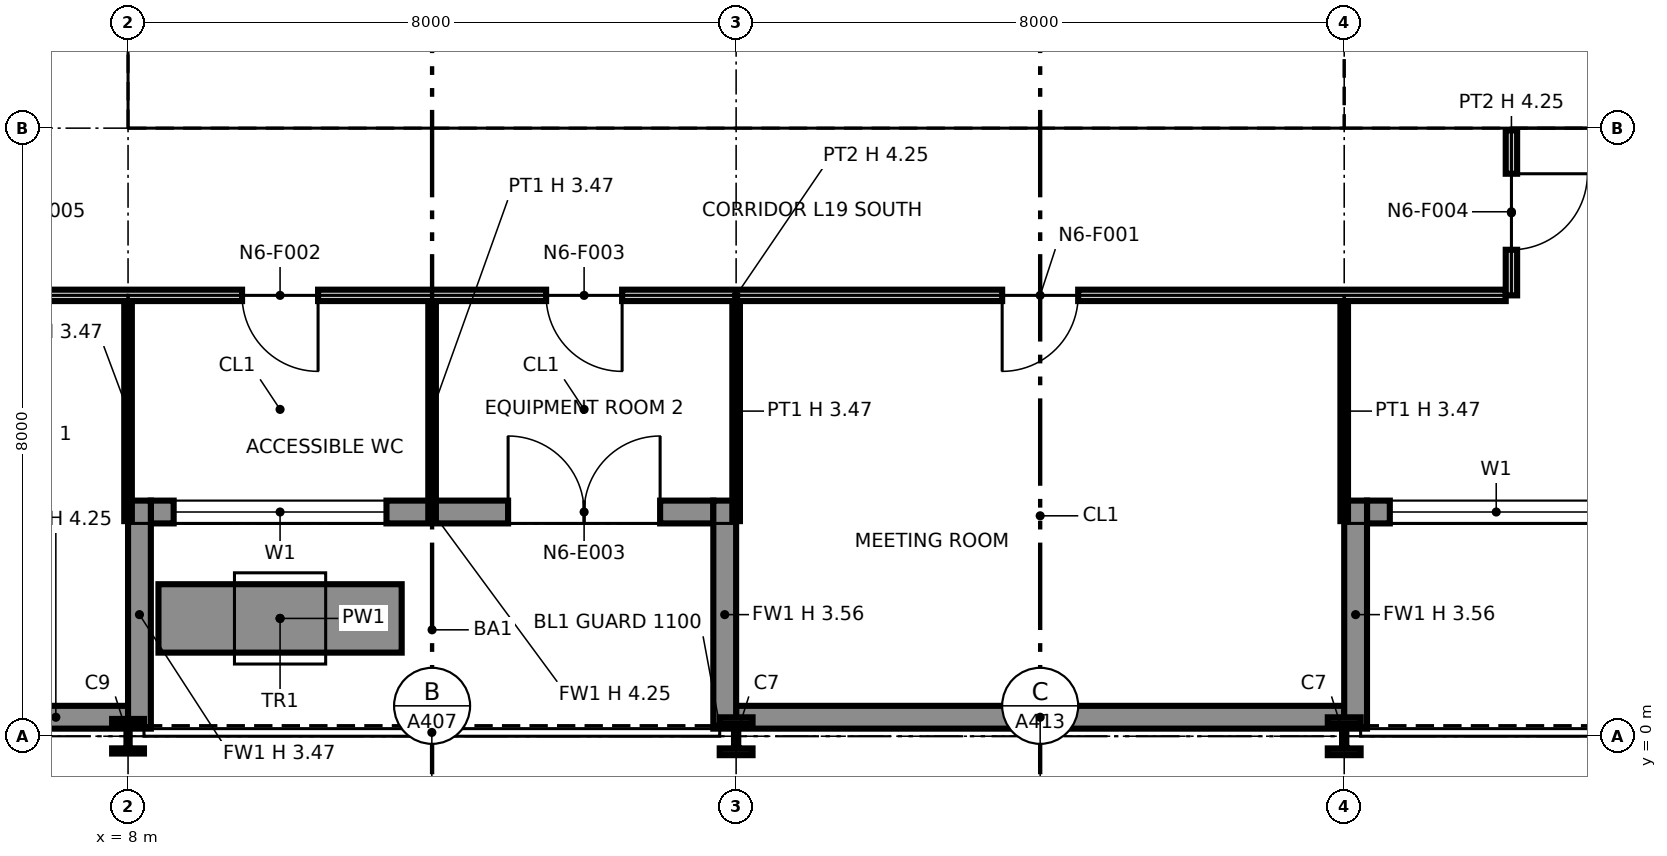
"""IFC4 building model, lengths in metres.
Left out: names, types, materials, properties, quantities, classifications, styles, units other than length and angle.
Written with IfcOpenShell. Run it as: python <this file> out.ifc"""

import sys

from ifc_helpers import new_model, si_unit, direction, frame, frame_2d, origin, origin_2d, place, context, subcontext, project, spatial, polyline, rectangle, i_section, outline, extrude, element, fill, save


model = new_model("IFC4")
c1 = context("Model", 3, precision=1e-05, world=origin(), true_north=direction((0.0, 1.0)))
c2 = subcontext(c1, "Body", "Model", "MODEL_VIEW")
j1 = project(units=[si_unit("LENGTHUNIT", "METRE"), si_unit("PLANEANGLEUNIT", "RADIAN")], contexts=[c1])
p1 = place(None, origin())
s1 = spatial("IfcSite", under=j1, at=p1, CompositionType="ELEMENT")
p2 = place(p1, origin())
s2 = spatial("IfcBuilding", under=s1, at=p2, CompositionType="ELEMENT")
p3 = place(p2, frame((0.0, 0.0, 100.8)))
s3 = spatial("IfcBuildingStorey", under=s2, at=p3, CompositionType="ELEMENT", Elevation=100.8)
p4 = place(p3, frame((8.0, 0.0, 0.0), z_axis=(0.0, 0.0, 1.0), x_axis=(1.0, 0.0, 0.0)))
e1 = element("IfcColumn", 1, at=p4, inside=s3, PredefinedType="COLUMN", context=c2, shape_type="SweptSolid", body=[
    extrude(i_section(OverallWidth=0.419, OverallDepth=0.455, WebThickness=0.042, FlangeThickness=0.068, at=origin_2d()), origin(), (0.0, 0.0, 1.0), 4.25),
])
p5 = place(p3, frame((8.0, 8.0, 0.0), z_axis=(0.0, 0.0, 1.0), x_axis=(1.0, 0.0, 0.0)))
e2 = element("IfcColumn", 2, at=p5, inside=s3, PredefinedType="COLUMN", context=c2, shape_type="SweptSolid", body=[
    extrude(i_section(OverallWidth=0.406, OverallDepth=0.417, WebThickness=0.03, FlangeThickness=0.048, at=origin_2d()), origin(), (0.0, 0.0, 1.0), 4.25),
])
p6 = place(p3, frame((16.0, 0.0, 0.0), z_axis=(0.0, 0.0, 1.0), x_axis=(1.0, 0.0, 0.0)))
e3 = element("IfcColumn", 3, at=p6, inside=s3, PredefinedType="COLUMN", context=c2, shape_type="SweptSolid", body=[
    extrude(i_section(OverallWidth=0.432, OverallDepth=0.498, WebThickness=0.056, FlangeThickness=0.089, at=origin_2d()), origin(), (0.0, 0.0, 1.0), 4.25),
])
p7 = place(p3, frame((16.0, 8.0, 0.0), z_axis=(0.0, 0.0, 1.0), x_axis=(1.0, 0.0, 0.0)))
e4 = element("IfcColumn", 4, at=p7, inside=s3, PredefinedType="COLUMN", context=c2, shape_type="SweptSolid", body=[
    extrude(i_section(OverallWidth=0.406, OverallDepth=0.417, WebThickness=0.03, FlangeThickness=0.048, at=origin_2d()), origin(), (0.0, 0.0, 1.0), 4.25),
])
p8 = place(p3, frame((24.0, 0.0, 0.0), z_axis=(0.0, 0.0, 1.0), x_axis=(1.0, 0.0, 0.0)))
e5 = element("IfcColumn", 5, at=p8, inside=s3, PredefinedType="COLUMN", context=c2, shape_type="SweptSolid", body=[
    extrude(i_section(OverallWidth=0.432, OverallDepth=0.498, WebThickness=0.056, FlangeThickness=0.089, at=origin_2d()), origin(), (0.0, 0.0, 1.0), 4.25),
])
p9 = place(p3, frame((24.0, 8.0, 0.0), z_axis=(0.0, 0.0, 1.0), x_axis=(1.0, 0.0, 0.0)))
e6 = element("IfcColumn", 6, at=p9, inside=s3, PredefinedType="COLUMN", context=c2, shape_type="SweptSolid", body=[
    extrude(i_section(OverallWidth=0.411, OverallDepth=0.434, WebThickness=0.036, FlangeThickness=0.057, at=origin_2d()), origin(), (0.0, 0.0, 1.0), 4.25),
])
p10 = place(p3, frame((6.1, 0.25, 0.0), z_axis=(0.0, 0.0, 1.0), x_axis=(1.0, 0.0, 0.0)))
e7 = element("IfcWall", 7, at=p10, inside=s3, PredefinedType="SOLIDWALL", context=c2, shape_type="SweptSolid", body=[
    extrude(rectangle(XDim=1.9, YDim=0.3, at=frame_2d((0.95, 0.0))), origin(), (0.0, 0.0, 1.0), 4.25),
])
p11 = place(p3, frame((8.3, 2.95, 0.0), z_axis=(0.0, 0.0, 1.0), x_axis=(1.0, 0.0, 0.0)))
e8 = element("IfcWall", 8, at=p11, inside=s3, PredefinedType="SOLIDWALL", context=c2, shape_type="SweptSolid", body=[
    extrude(rectangle(XDim=7.4, YDim=0.3, at=frame_2d((3.7, 0.0))), origin(), (0.0, 0.0, 1.0), 4.25),
])
p12 = place(p11, frame((0.3, 0.0, 0.9)))
e9 = element("IfcOpeningElement", 9, at=p12, cuts=e8, PredefinedType="OPENING", context=c2, shape_type="SweptSolid", body=[
    extrude(rectangle(XDim=2.8, YDim=2.2, at=frame_2d((1.4, 1.1))), frame((0.0, 0.16, 0.0), z_axis=(0.0, -1.0, 0.0), x_axis=(1.0, 0.0, 0.0)), (0.0, 0.0, 1.0), 0.32),
])
p13 = place(p11, frame((4.7, 0.0, 0.0)))
e10 = element("IfcOpeningElement", 10, at=p13, cuts=e8, PredefinedType="OPENING", context=c2, shape_type="SweptSolid", body=[
    extrude(rectangle(XDim=2.0, YDim=2.4, at=frame_2d((1.0, 1.2))), frame((0.0, 0.16, 0.0), z_axis=(0.0, -1.0, 0.0), x_axis=(1.0, 0.0, 0.0)), (0.0, 0.0, 1.0), 0.32),
])
p14 = place(p3, frame((8.15, 0.1, 0.0), z_axis=(0.0, 0.0, 1.0), x_axis=(0.0, 1.0, 0.0)))
e11 = element("IfcWall", 11, at=p14, inside=s3, PredefinedType="SOLIDWALL", context=c2, shape_type="SweptSolid", body=[
    extrude(rectangle(XDim=3.0, YDim=0.3, at=frame_2d((1.5, 0.0))), origin(), (0.0, 0.0, 1.0), 3.469),
])
p15 = place(p3, frame((15.85, 0.1, 0.0), z_axis=(0.0, 0.0, 1.0), x_axis=(0.0, 1.0, 0.0)))
e12 = element("IfcWall", 12, at=p15, inside=s3, PredefinedType="SOLIDWALL", context=c2, shape_type="SweptSolid", body=[
    extrude(rectangle(XDim=3.0, YDim=0.3, at=frame_2d((1.5, 0.0))), origin(), (0.0, 0.0, 1.0), 3.556),
])
p16 = place(p3, frame((16.0, 0.25, 0.0), z_axis=(0.0, 0.0, 1.0), x_axis=(1.0, 0.0, 0.0)))
e13 = element("IfcWall", 13, at=p16, inside=s3, PredefinedType="SOLIDWALL", context=c2, shape_type="SweptSolid", body=[
    extrude(rectangle(XDim=8.0, YDim=0.3, at=frame_2d((4.0, 0.0))), origin(), (0.0, 0.0, 1.0), 4.25),
])
p17 = place(p3, frame((24.3, 2.95, 0.0), z_axis=(0.0, 0.0, 1.0), x_axis=(1.0, 0.0, 0.0)))
e14 = element("IfcWall", 14, at=p17, inside=s3, PredefinedType="SOLIDWALL", context=c2, shape_type="SweptSolid", body=[
    extrude(rectangle(XDim=7.4, YDim=0.3, at=frame_2d((3.7, 0.0))), origin(), (0.0, 0.0, 1.0), 4.25),
])
p18 = place(p17, frame((0.3, 0.0, 0.9)))
e15 = element("IfcOpeningElement", 15, at=p18, cuts=e14, PredefinedType="OPENING", context=c2, shape_type="SweptSolid", body=[
    extrude(rectangle(XDim=2.8, YDim=2.2, at=frame_2d((1.4, 1.1))), frame((0.0, 0.16, 0.0), z_axis=(0.0, -1.0, 0.0), x_axis=(1.0, 0.0, 0.0)), (0.0, 0.0, 1.0), 0.32),
])
p19 = place(p17, frame((4.7, 0.0, 0.0)))
e16 = element("IfcOpeningElement", 16, at=p19, cuts=e14, PredefinedType="OPENING", context=c2, shape_type="SweptSolid", body=[
    extrude(rectangle(XDim=2.0, YDim=2.4, at=frame_2d((1.0, 1.2))), frame((0.0, 0.16, 0.0), z_axis=(0.0, -1.0, 0.0), x_axis=(1.0, 0.0, 0.0)), (0.0, 0.0, 1.0), 0.32),
])
p20 = place(p3, frame((24.15, 0.1, 0.0), z_axis=(0.0, 0.0, 1.0), x_axis=(0.0, 1.0, 0.0)))
e17 = element("IfcWall", 17, at=p20, inside=s3, PredefinedType="SOLIDWALL", context=c2, shape_type="SweptSolid", body=[
    extrude(rectangle(XDim=3.0, YDim=0.3, at=frame_2d((1.5, 0.0))), origin(), (0.0, 0.0, 1.0), 3.556),
])
p21 = place(p3, frame((8.4, 1.55, 0.0), z_axis=(0.0, 0.0, 1.0), x_axis=(1.0, 0.0, 0.0)))
e18 = element("IfcWall", 18, at=p21, inside=s3, PredefinedType="SOLIDWALL", context=c2, shape_type="SweptSolid", body=[
    extrude(rectangle(XDim=3.2, YDim=0.9, at=frame_2d((1.6, 0.0))), origin(), (0.0, 0.0, 1.0), 0.6),
])
p22 = place(p3, frame((8.65, 8.75, 0.0), z_axis=(0.0, 0.0, 1.0), x_axis=(1.0, 0.0, 0.0)))
e19 = element("IfcWall", 19, at=p22, inside=s3, PredefinedType="PARTITIONING", context=c2, shape_type="SweptSolid", body=[
    extrude(outline(polyline([(0.0, 0.0), (14.7, 0.0), (14.7, 4.25), (7.469, 4.25), (7.469, 3.632), (7.231, 3.632), (7.23, 4.25), (0.0, 4.25), (0.0, 0.0)])), frame((0.0, 0.1, 0.0), z_axis=(0.0, -1.0, 0.0), x_axis=(1.0, 0.0, 0.0)), (0.0, 0.0, 1.0), 0.2),
])
p23 = place(p22, frame((1.3, 0.0, 0.0)))
e20 = element("IfcOpeningElement", 20, at=p23, cuts=e19, PredefinedType="OPENING", context=c2, shape_type="SweptSolid", body=[
    extrude(rectangle(XDim=1.4, YDim=2.1, at=frame_2d((0.7, 1.05))), frame((0.0, 0.11, 0.0), z_axis=(0.0, -1.0, 0.0), x_axis=(1.0, 0.0, 0.0)), (0.0, 0.0, 1.0), 0.22),
])
p24 = place(p22, frame((4.6, 0.0, 0.0)))
e21 = element("IfcOpeningElement", 21, at=p24, cuts=e19, PredefinedType="OPENING", context=c2, shape_type="SweptSolid", body=[
    extrude(rectangle(XDim=1.4, YDim=2.1, at=frame_2d((0.7, 1.05))), frame((0.0, 0.11, 0.0), z_axis=(0.0, -1.0, 0.0), x_axis=(1.0, 0.0, 0.0)), (0.0, 0.0, 1.0), 0.22),
])
p25 = place(p22, frame((10.4, 0.0, 0.0)))
e22 = element("IfcOpeningElement", 22, at=p25, cuts=e19, PredefinedType="OPENING", context=c2, shape_type="SweptSolid", body=[
    extrude(rectangle(XDim=1.2, YDim=2.1, at=frame_2d((0.6, 1.05))), frame((0.0, 0.11, 0.0), z_axis=(0.0, -1.0, 0.0), x_axis=(1.0, 0.0, 0.0)), (0.0, 0.0, 1.0), 0.22),
])
p26 = place(p3, frame((8.75, 8.85, 0.0), z_axis=(0.0, 0.0, 1.0), x_axis=(0.0, 1.0, 0.0)))
e23 = element("IfcWall", 23, at=p26, inside=s3, PredefinedType="PARTITIONING", context=c2, shape_type="SweptSolid", body=[
    extrude(outline(polyline([(0.0, 0.0), (14.3, 0.0), (14.3, 4.25), (10.231, 4.25), (10.23, 3.789), (10.07, 3.789), (10.069, 4.25), (7.27, 4.25), (7.269, 3.632), (7.031, 3.632), (7.031, 4.25), (0.0, 4.25), (0.0, 0.0)])), frame((0.0, 0.1, 0.0), z_axis=(0.0, -1.0, 0.0), x_axis=(1.0, 0.0, 0.0)), (0.0, 0.0, 1.0), 0.2),
])
p27 = place(p26, frame((8.3, 0.0, 0.0)))
e24 = element("IfcOpeningElement", 24, at=p27, cuts=e23, PredefinedType="OPENING", context=c2, shape_type="SweptSolid", body=[
    extrude(rectangle(XDim=1.8, YDim=2.1, at=frame_2d((0.9, 1.05))), frame((0.0, 0.11, 0.0), z_axis=(0.0, -1.0, 0.0), x_axis=(1.0, 0.0, 0.0)), (0.0, 0.0, 1.0), 0.22),
])
p28 = place(p3, frame((12.4, 8.85, 0.0), z_axis=(0.0, 0.0, 1.0), x_axis=(0.0, 1.0, 0.0)))
e25 = element("IfcWall", 25, at=p28, inside=s3, PredefinedType="PARTITIONING", context=c2, shape_type="SweptSolid", body=[
    extrude(rectangle(XDim=6.85, YDim=0.2, at=frame_2d((3.425, 0.0))), origin(), (0.0, 0.0, 1.0), 4.25),
])
p29 = place(p3, frame((15.85, 8.85, 0.0), z_axis=(0.0, 0.0, 1.0), x_axis=(0.0, 1.0, 0.0)))
e26 = element("IfcWall", 26, at=p29, inside=s3, PredefinedType="PARTITIONING", context=c2, shape_type="SweptSolid", body=[
    extrude(rectangle(XDim=1.55, YDim=0.9, at=frame_2d((0.775, 0.0))), origin(), (0.0, 0.0, 1.0), 3.632),
])
p30 = place(p29, frame((0.3, 0.0, 0.0)))
e27 = element("IfcOpeningElement", 27, at=p30, cuts=e26, PredefinedType="OPENING", context=c2, shape_type="SweptSolid", body=[
    extrude(rectangle(XDim=1.1, YDim=2.1, at=frame_2d((0.55, 1.05))), frame((0.0, 0.46, 0.0), z_axis=(0.0, -1.0, 0.0), x_axis=(1.0, 0.0, 0.0)), (0.0, 0.0, 1.0), 0.92),
])
p31 = place(p3, frame((23.25, 8.85, 0.0), z_axis=(0.0, 0.0, 1.0), x_axis=(0.0, 1.0, 0.0)))
e28 = element("IfcWall", 28, at=p31, inside=s3, PredefinedType="PARTITIONING", context=c2, shape_type="SweptSolid", body=[
    extrude(outline(polyline([(0.0, 0.0), (14.3, 0.0), (14.3, 4.25), (11.231, 4.25), (11.23, 3.789), (11.07, 3.789), (11.069, 4.25), (7.27, 4.25), (7.269, 3.632), (7.031, 3.632), (7.031, 4.25), (1.231, 4.25), (1.23, 3.789), (1.07, 3.789), (1.069, 4.25), (0.0, 4.25), (0.0, 0.0)])), frame((0.0, 0.1, 0.0), z_axis=(0.0, -1.0, 0.0), x_axis=(1.0, 0.0, 0.0)), (0.0, 0.0, 1.0), 0.2),
])
p32 = place(p31, frame((8.3, 0.0, 0.0)))
e29 = element("IfcOpeningElement", 29, at=p32, cuts=e28, PredefinedType="OPENING", context=c2, shape_type="SweptSolid", body=[
    extrude(rectangle(XDim=1.8, YDim=2.1, at=frame_2d((0.9, 1.05))), frame((0.0, 0.11, 0.0), z_axis=(0.0, -1.0, 0.0), x_axis=(1.0, 0.0, 0.0)), (0.0, 0.0, 1.0), 0.22),
])
p33 = place(p3, frame((24.65, 8.75, 0.0), z_axis=(0.0, 0.0, 1.0), x_axis=(1.0, 0.0, 0.0)))
e30 = element("IfcWall", 30, at=p33, inside=s3, PredefinedType="PARTITIONING", context=c2, shape_type="SweptSolid", body=[
    extrude(outline(polyline([(0.0, 0.0), (14.7, 0.0), (14.7, 4.25), (7.469, 4.25), (7.469, 3.632), (7.231, 3.632), (7.23, 4.25), (0.0, 4.25), (0.0, 0.0)])), frame((0.0, 0.1, 0.0), z_axis=(0.0, -1.0, 0.0), x_axis=(1.0, 0.0, 0.0)), (0.0, 0.0, 1.0), 0.2),
])
p34 = place(p3, frame((24.75, 8.85, 0.0), z_axis=(0.0, 0.0, 1.0), x_axis=(0.0, 1.0, 0.0)))
e31 = element("IfcWall", 31, at=p34, inside=s3, PredefinedType="PARTITIONING", context=c2, shape_type="SweptSolid", body=[
    extrude(outline(polyline([(0.0, 0.0), (6.3, 0.0), (6.3, 4.25), (3.231, 4.25), (3.23, 3.789), (3.07, 3.789), (3.069, 4.25), (0.0, 4.25), (0.0, 0.0)])), frame((0.0, 0.1, 0.0), z_axis=(0.0, -1.0, 0.0), x_axis=(1.0, 0.0, 0.0)), (0.0, 0.0, 1.0), 0.2),
])
for number, where, z_axis, x_axis in (
    (32, (8.0, 2.83, 0.0), (0.0, 0.0, 1.0), (0.0, 1.0, 0.0)),
    (33, (12.0, 2.83, 0.0), (0.0, 0.0, 1.0), (0.0, 1.0, 0.0)),
    (34, (16.0, 2.83, 0.0), (0.0, 0.0, 1.0), (0.0, 1.0, 0.0)),
    (35, (24.0, 2.83, 0.0), (0.0, 0.0, 1.0), (0.0, 1.0, 0.0)),
):
    element("IfcWall", number, at=place(p3, frame(where, z_axis=z_axis, x_axis=x_axis)), inside=s3, PredefinedType="PARTITIONING", context=c2, shape_type="SweptSolid", body=[
        extrude(rectangle(XDim=2.895, YDim=0.1, at=frame_2d((1.448, 0.0))), origin(), (0.0, 0.0, 1.0), 3.47),
    ])
p35 = place(p3, frame((5.875, 5.8, 0.0), z_axis=(0.0, 0.0, 1.0), x_axis=(1.0, 0.0, 0.0)))
e36 = element("IfcWall", 36, at=p35, inside=s3, PredefinedType="PARTITIONING", context=c2, shape_type="SweptSolid", body=[
    extrude(rectangle(XDim=20.25, YDim=0.15, at=frame_2d((10.125, 0.0))), origin(), (0.0, 0.0, 1.0), 4.25),
])
p36 = place(p35, frame((14.625, 0.0, 0.0), z_axis=(0.0, 0.0, 1.0), x_axis=(-1.0, 0.0, 0.0)))
e37 = element("IfcOpeningElement", 37, at=p36, cuts=e36, PredefinedType="OPENING", context=c2, shape_type="SweptSolid", body=[
    extrude(rectangle(XDim=1.0, YDim=2.1, at=frame_2d((0.5, 1.05))), frame((0.0, 0.085, 0.0), z_axis=(0.0, -1.0, 0.0), x_axis=(1.0, 0.0, 0.0)), (0.0, 0.0, 1.0), 0.17),
])
p37 = place(p35, frame((4.625, 0.0, 0.0), z_axis=(0.0, 0.0, 1.0), x_axis=(-1.0, 0.0, 0.0)))
e38 = element("IfcOpeningElement", 38, at=p37, cuts=e36, PredefinedType="OPENING", context=c2, shape_type="SweptSolid", body=[
    extrude(rectangle(XDim=1.0, YDim=2.1, at=frame_2d((0.5, 1.05))), frame((0.0, 0.085, 0.0), z_axis=(0.0, -1.0, 0.0), x_axis=(1.0, 0.0, 0.0)), (0.0, 0.0, 1.0), 0.17),
])
p38 = place(p35, frame((8.625, 0.0, 0.0), z_axis=(0.0, 0.0, 1.0), x_axis=(-1.0, 0.0, 0.0)))
e39 = element("IfcOpeningElement", 39, at=p38, cuts=e36, PredefinedType="OPENING", context=c2, shape_type="SweptSolid", body=[
    extrude(rectangle(XDim=1.0, YDim=2.1, at=frame_2d((0.5, 1.05))), frame((0.0, 0.085, 0.0), z_axis=(0.0, -1.0, 0.0), x_axis=(1.0, 0.0, 0.0)), (0.0, 0.0, 1.0), 0.17),
])
p39 = place(p3, frame((26.2, 5.8, 0.0), z_axis=(0.0, 0.0, 1.0), x_axis=(0.0, 1.0, 0.0)))
e40 = element("IfcWall", 40, at=p39, inside=s3, PredefinedType="PARTITIONING", context=c2, shape_type="SweptSolid", body=[
    extrude(rectangle(XDim=2.17, YDim=0.15, at=frame_2d((1.085, 0.0))), origin(), (0.0, 0.0, 1.0), 4.25),
])
p40 = place(p39, frame((1.6, 0.0, 0.0), z_axis=(0.0, 0.0, 1.0), x_axis=(-1.0, 0.0, 0.0)))
e41 = element("IfcOpeningElement", 41, at=p40, cuts=e40, PredefinedType="OPENING", context=c2, shape_type="SweptSolid", body=[
    extrude(rectangle(XDim=1.0, YDim=2.1, at=frame_2d((0.5, 1.05))), frame((0.0, 0.085, 0.0), z_axis=(0.0, -1.0, 0.0), x_axis=(1.0, 0.0, 0.0)), (0.0, 0.0, 1.0), 0.17),
])
p41 = place(p12, origin())
e42 = element("IfcWindow", 42, at=p41, inside=s3, PartitioningType="SINGLE_PANEL", PredefinedType="WINDOW", context=c2, shape_type="SweptSolid", body=[
    extrude(rectangle(XDim=2.8, YDim=2.2, at=frame_2d((1.4, 1.1))), frame((0.0, 0.03, 0.0), z_axis=(0.0, -1.0, 0.0), x_axis=(1.0, 0.0, 0.0)), (0.0, 0.0, 1.0), 0.06),
])
fill(e9, e42)
p42 = place(p13, origin())
e43 = element("IfcDoor", 43, at=p42, inside=s3, OperationType="DOUBLE_DOOR_SINGLE_SWING", PredefinedType="DOOR", context=c2, shape_type="SweptSolid", body=[
    extrude(rectangle(XDim=2.0, YDim=2.4, at=frame_2d((1.0, 1.2))), frame((0.0, 0.025, 0.0), z_axis=(0.0, -1.0, 0.0), x_axis=(1.0, 0.0, 0.0)), (0.0, 0.0, 1.0), 0.05),
])
fill(e10, e43)
p43 = place(p18, origin())
e44 = element("IfcWindow", 44, at=p43, inside=s3, PartitioningType="SINGLE_PANEL", PredefinedType="WINDOW", context=c2, shape_type="SweptSolid", body=[
    extrude(rectangle(XDim=2.8, YDim=2.2, at=frame_2d((1.4, 1.1))), frame((0.0, 0.03, 0.0), z_axis=(0.0, -1.0, 0.0), x_axis=(1.0, 0.0, 0.0)), (0.0, 0.0, 1.0), 0.06),
])
fill(e15, e44)
p44 = place(p23, origin())
e45 = element("IfcDoor", 45, at=p44, inside=s3, OperationType="DOUBLE_DOOR_SINGLE_SWING", PredefinedType="NOTDEFINED", context=c2, shape_type="SweptSolid", body=[
    extrude(rectangle(XDim=1.4, YDim=2.1, at=frame_2d((0.7, 1.05))), frame((0.0, 0.025, 0.0), z_axis=(0.0, -1.0, 0.0), x_axis=(1.0, 0.0, 0.0)), (0.0, 0.0, 1.0), 0.05),
])
fill(e20, e45)
p45 = place(p24, origin())
e46 = element("IfcDoor", 46, at=p45, inside=s3, OperationType="DOUBLE_DOOR_SINGLE_SWING", PredefinedType="NOTDEFINED", context=c2, shape_type="SweptSolid", body=[
    extrude(rectangle(XDim=1.4, YDim=2.1, at=frame_2d((0.7, 1.05))), frame((0.0, 0.025, 0.0), z_axis=(0.0, -1.0, 0.0), x_axis=(1.0, 0.0, 0.0)), (0.0, 0.0, 1.0), 0.05),
])
fill(e21, e46)
p46 = place(p25, origin())
e47 = element("IfcDoor", 47, at=p46, inside=s3, OperationType="SINGLE_SWING_LEFT", PredefinedType="NOTDEFINED", context=c2, shape_type="SweptSolid", body=[
    extrude(rectangle(XDim=1.2, YDim=2.1, at=frame_2d((0.6, 1.05))), frame((0.0, 0.025, 0.0), z_axis=(0.0, -1.0, 0.0), x_axis=(1.0, 0.0, 0.0)), (0.0, 0.0, 1.0), 0.05),
])
fill(e22, e47)
p47 = place(p36, origin())
e48 = element("IfcDoor", 48, at=p47, inside=s3, OperationType="SINGLE_SWING_RIGHT", PredefinedType="DOOR", context=c2, shape_type="SweptSolid", body=[
    extrude(rectangle(XDim=1.0, YDim=2.1, at=frame_2d((0.5, 1.05))), frame((0.0, 0.025, 0.0), z_axis=(0.0, -1.0, 0.0), x_axis=(1.0, 0.0, 0.0)), (0.0, 0.0, 1.0), 0.05),
])
fill(e37, e48)
p48 = place(p37, origin())
e49 = element("IfcDoor", 49, at=p48, inside=s3, OperationType="SINGLE_SWING_LEFT", PredefinedType="DOOR", context=c2, shape_type="SweptSolid", body=[
    extrude(rectangle(XDim=1.0, YDim=2.1, at=frame_2d((0.5, 1.05))), frame((0.0, 0.025, 0.0), z_axis=(0.0, -1.0, 0.0), x_axis=(1.0, 0.0, 0.0)), (0.0, 0.0, 1.0), 0.05),
])
fill(e38, e49)
p49 = place(p38, origin())
e50 = element("IfcDoor", 50, at=p49, inside=s3, OperationType="SINGLE_SWING_LEFT", PredefinedType="DOOR", context=c2, shape_type="SweptSolid", body=[
    extrude(rectangle(XDim=1.0, YDim=2.1, at=frame_2d((0.5, 1.05))), frame((0.0, 0.025, 0.0), z_axis=(0.0, -1.0, 0.0), x_axis=(1.0, 0.0, 0.0)), (0.0, 0.0, 1.0), 0.05),
])
fill(e39, e50)
p50 = place(p40, origin())
e51 = element("IfcDoor", 51, at=p50, inside=s3, OperationType="SINGLE_SWING_LEFT", PredefinedType="DOOR", context=c2, shape_type="SweptSolid", body=[
    extrude(rectangle(XDim=1.0, YDim=2.1, at=frame_2d((0.5, 1.05))), frame((0.0, 0.025, 0.0), z_axis=(0.0, -1.0, 0.0), x_axis=(1.0, 0.0, 0.0)), (0.0, 0.0, 1.0), 0.05),
])
fill(e41, e51)
save(model, sys.argv[1])
